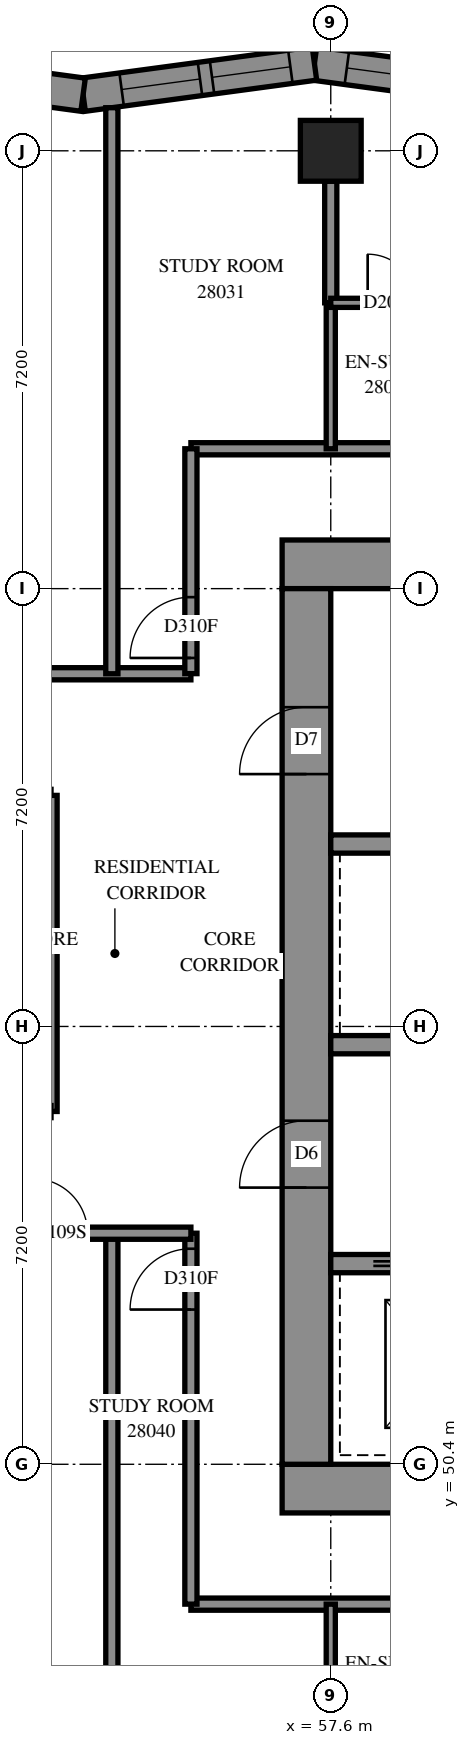
"""IFC4 building model, lengths in metres.
Left out: names, types, materials, properties, quantities, classifications, styles, units other than length and angle.
Written with IfcOpenShell. Run it as: python <this file> out.ifc"""

import sys

from ifc_helpers import new_model, si_unit, direction, frame, frame_2d, origin, origin_2d, place, context, subcontext, project, spatial, polyline, rectangle, outline, extrude, element, fill, save


model = new_model("IFC4")
c1 = context("Model", 3, precision=1e-05, world=origin(), true_north=direction((0.0, 1.0)))
c2 = subcontext(c1, "Body", "Model", "MODEL_VIEW")
j1 = project(units=[si_unit("LENGTHUNIT", "METRE"), si_unit("PLANEANGLEUNIT", "RADIAN")], contexts=[c1])
p1 = place(None, origin())
s1 = spatial("IfcSite", under=j1, at=p1, CompositionType="ELEMENT")
p2 = place(p1, origin())
s2 = spatial("IfcBuilding", under=s1, at=p2, CompositionType="ELEMENT")
p3 = place(p2, frame((0.0, 0.0, 105.0)))
s3 = spatial("IfcBuildingStorey", under=s2, at=p3, CompositionType="ELEMENT", Elevation=105.0)
p4 = place(p3, frame((57.6, 72.0, 0.0), z_axis=(0.0, 0.0, 1.0), x_axis=(1.0, 0.0, 0.0)))
e1 = element("IfcColumn", 1, at=p4, inside=s3, PredefinedType="COLUMN", context=c2, shape_type="SweptSolid", body=[
    extrude(rectangle(XDim=1.0, YDim=1.0, at=origin_2d()), origin(), (0.0, 0.0, 1.0), 3.1),
])
p5 = place(p3, frame((56.8, 50.0, -0.3), z_axis=(0.0, 0.0, 1.0), x_axis=(1.0, 0.0, 0.0)))
e2 = element("IfcWall", 2, at=p5, inside=s3, PredefinedType="SHEAR", context=c2, shape_type="SweptSolid", body=[
    extrude(rectangle(XDim=16.0, YDim=0.8, at=frame_2d((8.0, 0.0))), origin(), (0.0, 0.0, 1.0), 2.7),
])
p6 = place(p3, frame((56.8, 65.2, -0.3), z_axis=(0.0, 0.0, 1.0), x_axis=(1.0, 0.0, 0.0)))
e3 = element("IfcWall", 3, at=p6, inside=s3, PredefinedType="SHEAR", context=c2, shape_type="SweptSolid", body=[
    extrude(rectangle(XDim=16.0, YDim=0.8, at=frame_2d((8.0, 0.0))), origin(), (0.0, 0.0, 1.0), 2.7),
])
p7 = place(p6, frame((10.8, 0.0, 0.3)))
e4 = element("IfcOpeningElement", 4, at=p7, cuts=e3, PredefinedType="OPENING", context=c2, shape_type="SweptSolid", body=[
    extrude(rectangle(XDim=0.8, YDim=2.1, at=frame_2d((0.4, 1.05))), frame((0.0, 0.41, 0.0), z_axis=(0.0, -1.0, 0.0), x_axis=(1.0, 0.0, 0.0)), (0.0, 0.0, 1.0), 0.82),
])
p8 = place(p3, frame((57.2, 50.4, -0.3), z_axis=(0.0, 0.0, 1.0), x_axis=(0.0, 1.0, 0.0)))
e5 = element("IfcWall", 5, at=p8, inside=s3, PredefinedType="SHEAR", context=c2, shape_type="SweptSolid", body=[
    extrude(rectangle(XDim=14.4, YDim=0.8, at=frame_2d((7.2, 0.0))), origin(), (0.0, 0.0, 1.0), 2.7),
])
p9 = place(p8, frame((4.55, 0.0, 0.3)))
e6 = element("IfcOpeningElement", 6, at=p9, cuts=e5, PredefinedType="OPENING", context=c2, shape_type="SweptSolid", body=[
    extrude(rectangle(XDim=1.1, YDim=2.1, at=frame_2d((0.55, 1.05))), frame((0.0, 0.41, 0.0), z_axis=(0.0, -1.0, 0.0), x_axis=(1.0, 0.0, 0.0)), (0.0, 0.0, 1.0), 0.82),
])
p10 = place(p8, frame((11.35, 0.0, 0.3)))
e7 = element("IfcOpeningElement", 7, at=p10, cuts=e5, PredefinedType="OPENING", context=c2, shape_type="SweptSolid", body=[
    extrude(rectangle(XDim=1.1, YDim=2.1, at=frame_2d((0.55, 1.05))), frame((0.0, 0.41, 0.0), z_axis=(0.0, -1.0, 0.0), x_axis=(1.0, 0.0, 0.0)), (0.0, 0.0, 1.0), 0.82),
])
p11 = place(p3, frame((57.6, 53.7, 0.0), z_axis=(0.0, 0.0, 1.0), x_axis=(1.0, 0.0, 0.0)))
e8 = element("IfcWall", 8, at=p11, inside=s3, PredefinedType="SOLIDWALL", context=c2, shape_type="SweptSolid", body=[
    extrude(rectangle(XDim=14.4, YDim=0.3, at=frame_2d((7.2, 0.0))), origin(), (0.0, 0.0, 1.0), 3.1),
])
p12 = place(p11, frame((1.25, 0.0, 0.0)))
e9 = element("IfcOpeningElement", 9, at=p12, cuts=e8, PredefinedType="OPENING", context=c2, shape_type="SweptSolid", body=[
    extrude(rectangle(XDim=1.1, YDim=2.1, at=frame_2d((0.55, 1.05))), frame((0.0, 0.16, 0.0), z_axis=(0.0, -1.0, 0.0), x_axis=(1.0, 0.0, 0.0)), (0.0, 0.0, 1.0), 0.32),
])
p13 = place(p11, frame((4.85, 0.0, 0.0)))
e10 = element("IfcOpeningElement", 10, at=p13, cuts=e8, PredefinedType="OPENING", context=c2, shape_type="SweptSolid", body=[
    extrude(rectangle(XDim=1.1, YDim=2.1, at=frame_2d((0.55, 1.05))), frame((0.0, 0.16, 0.0), z_axis=(0.0, -1.0, 0.0), x_axis=(1.0, 0.0, 0.0)), (0.0, 0.0, 1.0), 0.32),
])
p14 = place(p11, frame((8.45, 0.0, 0.0)))
e11 = element("IfcOpeningElement", 11, at=p14, cuts=e8, PredefinedType="OPENING", context=c2, shape_type="SweptSolid", body=[
    extrude(rectangle(XDim=1.1, YDim=2.1, at=frame_2d((0.55, 1.05))), frame((0.0, 0.16, 0.0), z_axis=(0.0, -1.0, 0.0), x_axis=(1.0, 0.0, 0.0)), (0.0, 0.0, 1.0), 0.32),
])
p15 = place(p11, frame((12.05, 0.0, 0.0)))
e12 = element("IfcOpeningElement", 12, at=p15, cuts=e8, PredefinedType="OPENING", context=c2, shape_type="SweptSolid", body=[
    extrude(rectangle(XDim=1.1, YDim=2.1, at=frame_2d((0.55, 1.05))), frame((0.0, 0.16, 0.0), z_axis=(0.0, -1.0, 0.0), x_axis=(1.0, 0.0, 0.0)), (0.0, 0.0, 1.0), 0.32),
])
p16 = place(p3, frame((57.6, 57.3, 0.0), z_axis=(0.0, 0.0, 1.0), x_axis=(1.0, 0.0, 0.0)))
e13 = element("IfcWall", 13, at=p16, inside=s3, PredefinedType="SOLIDWALL", context=c2, shape_type="SweptSolid", body=[
    extrude(rectangle(XDim=14.4, YDim=0.3, at=frame_2d((7.2, 0.0))), origin(), (0.0, 0.0, 1.0), 3.1),
])
p17 = place(p16, frame((12.05, 0.0, 0.0)))
e14 = element("IfcOpeningElement", 14, at=p17, cuts=e13, PredefinedType="OPENING", context=c2, shape_type="SweptSolid", body=[
    extrude(rectangle(XDim=1.1, YDim=2.1, at=frame_2d((0.55, 1.05))), frame((0.0, 0.16, 0.0), z_axis=(0.0, -1.0, 0.0), x_axis=(1.0, 0.0, 0.0)), (0.0, 0.0, 1.0), 0.32),
])
p18 = place(p3, frame((57.6, 60.6, 0.0), z_axis=(0.0, 0.0, 1.0), x_axis=(1.0, 0.0, 0.0)))
e15 = element("IfcWall", 15, at=p18, inside=s3, PredefinedType="SOLIDWALL", context=c2, shape_type="SweptSolid", body=[
    extrude(rectangle(XDim=7.2, YDim=0.3, at=frame_2d((3.6, 0.0))), origin(), (0.0, 0.0, 1.0), 3.1),
])
p19 = place(p3, frame((61.136, 72.922, 0.0), z_axis=(0.0, 0.0, 1.0), x_axis=(-0.9910647018, 0.133381996, 0.0)))
e16 = element("IfcWall", 16, at=p19, inside=s3, PredefinedType="SOLIDWALL", context=c2, shape_type="SweptSolid", body=[
    extrude(outline(polyline([(0.037, -0.275), (3.876, -0.275), (3.802, 0.275), (-0.037, 0.275), (0.037, -0.275)])), origin(), (0.0, 0.0, 1.0), 3.1),
])
p20 = place(p19, frame((0.501, 0.0, 0.5)))
e17 = element("IfcOpeningElement", 17, at=p20, cuts=e16, PredefinedType="OPENING", context=c2, shape_type="SweptSolid", body=[
    extrude(rectangle(XDim=1.3, YDim=2.45, at=frame_2d((0.65, 1.225))), frame((0.0, 0.285, 0.0), z_axis=(0.0, -1.0, 0.0), x_axis=(1.0, 0.0, 0.0)), (0.0, 0.0, 1.0), 0.57),
])
p21 = place(p19, frame((2.001, 0.0, 0.5)))
e18 = element("IfcOpeningElement", 18, at=p21, cuts=e16, PredefinedType="OPENING", context=c2, shape_type="SweptSolid", body=[
    extrude(rectangle(XDim=1.3, YDim=2.45, at=frame_2d((0.65, 1.225))), frame((0.0, 0.285, 0.0), z_axis=(0.0, -1.0, 0.0), x_axis=(1.0, 0.0, 0.0)), (0.0, 0.0, 1.0), 0.57),
])
p22 = place(p3, frame((57.332, 73.434, 0.0), z_axis=(0.0, 0.0, 1.0), x_axis=(-0.9910651652, -0.1333785524, 0.0)))
e19 = element("IfcWall", 19, at=p22, inside=s3, PredefinedType="SOLIDWALL", context=c2, shape_type="SweptSolid", body=[
    extrude(outline(polyline([(-0.037, -0.275), (3.802, -0.275), (3.876, 0.275), (0.037, 0.275), (-0.037, -0.275)])), origin(), (0.0, 0.0, 1.0), 3.1),
])
p23 = place(p22, frame((0.399, 0.0, 0.5)))
e20 = element("IfcOpeningElement", 20, at=p23, cuts=e19, PredefinedType="OPENING", context=c2, shape_type="SweptSolid", body=[
    extrude(rectangle(XDim=1.3, YDim=2.45, at=frame_2d((0.65, 1.225))), frame((0.0, 0.285, 0.0), z_axis=(0.0, -1.0, 0.0), x_axis=(1.0, 0.0, 0.0)), (0.0, 0.0, 1.0), 0.57),
])
p24 = place(p22, frame((1.899, 0.0, 0.5)))
e21 = element("IfcOpeningElement", 21, at=p24, cuts=e19, PredefinedType="OPENING", context=c2, shape_type="SweptSolid", body=[
    extrude(rectangle(XDim=1.3, YDim=2.45, at=frame_2d((0.65, 1.225))), frame((0.0, 0.285, 0.0), z_axis=(0.0, -1.0, 0.0), x_axis=(1.0, 0.0, 0.0)), (0.0, 0.0, 1.0), 0.57),
])
p25 = place(p3, frame((53.527, 72.922, 0.0), z_axis=(0.0, 0.0, 1.0), x_axis=(-0.9910647018, 0.133381996, 0.0)))
e22 = element("IfcWall", 22, at=p25, inside=s3, PredefinedType="SOLIDWALL", context=c2, shape_type="SweptSolid", body=[
    extrude(outline(polyline([(0.037, -0.275), (3.876, -0.275), (3.802, 0.275), (-0.037, 0.275), (0.037, -0.275)])), origin(), (0.0, 0.0, 1.0), 3.1),
])
p26 = place(p25, frame((1.078, 0.0, 0.5)))
e23 = element("IfcOpeningElement", 23, at=p26, cuts=e22, PredefinedType="OPENING", context=c2, shape_type="SweptSolid", body=[
    extrude(rectangle(XDim=1.2, YDim=2.45, at=frame_2d((0.6, 1.225))), frame((0.0, 0.285, 0.0), z_axis=(0.0, -1.0, 0.0), x_axis=(1.0, 0.0, 0.0)), (0.0, 0.0, 1.0), 0.57),
])
p27 = place(p3, frame((33.4, 63.4, 0.0), z_axis=(0.0, 0.0, 1.0), x_axis=(1.0, 0.0, 0.0)))
e24 = element("IfcWall", 24, at=p27, inside=s3, PredefinedType="PARTITIONING", context=c2, shape_type="SweptSolid", body=[
    extrude(rectangle(XDim=21.9, YDim=0.2, at=frame_2d((10.95, 0.0))), origin(), (0.0, 0.0, 1.0), 3.1),
])
p28 = place(p27, frame((3.152, 0.0, 0.0)))
e25 = element("IfcOpeningElement", 25, at=p28, cuts=e24, PredefinedType="OPENING", context=c2, shape_type="SweptSolid", body=[
    extrude(rectangle(XDim=0.9, YDim=2.1, at=frame_2d((0.45, 1.05))), frame((0.0, 0.11, 0.0), z_axis=(0.0, -1.0, 0.0), x_axis=(1.0, 0.0, 0.0)), (0.0, 0.0, 1.0), 0.22),
])
p29 = place(p27, frame((8.161, 0.0, 0.0)))
e26 = element("IfcOpeningElement", 26, at=p29, cuts=e24, PredefinedType="OPENING", context=c2, shape_type="SweptSolid", body=[
    extrude(rectangle(XDim=0.9, YDim=2.1, at=frame_2d((0.45, 1.05))), frame((0.0, 0.11, 0.0), z_axis=(0.0, -1.0, 0.0), x_axis=(1.0, 0.0, 0.0)), (0.0, 0.0, 1.0), 0.22),
])
p30 = place(p27, frame((15.471, 0.0, 0.0)))
e27 = element("IfcOpeningElement", 27, at=p30, cuts=e24, PredefinedType="OPENING", context=c2, shape_type="SweptSolid", body=[
    extrude(rectangle(XDim=1.0, YDim=2.1, at=frame_2d((0.5, 1.05))), frame((0.0, 0.11, 0.0), z_axis=(0.0, -1.0, 0.0), x_axis=(1.0, 0.0, 0.0)), (0.0, 0.0, 1.0), 0.22),
])
p31 = place(p3, frame((55.3, 48.1, 0.0), z_axis=(0.0, 0.0, 1.0), x_axis=(1.0, 0.0, 0.0)))
e28 = element("IfcWall", 28, at=p31, inside=s3, PredefinedType="PARTITIONING", context=c2, shape_type="SweptSolid", body=[
    extrude(rectangle(XDim=19.092, YDim=0.2, at=frame_2d((9.546, 0.0))), origin(), (0.0, 0.0, 1.0), 3.1),
])
p32 = place(p31, frame((4.6, 0.0, 0.0)))
e29 = element("IfcOpeningElement", 29, at=p32, cuts=e28, PredefinedType="OPENING", context=c2, shape_type="SweptSolid", body=[
    extrude(rectangle(XDim=0.9, YDim=2.1, at=frame_2d((0.45, 1.05))), frame((0.0, 0.11, 0.0), z_axis=(0.0, -1.0, 0.0), x_axis=(1.0, 0.0, 0.0)), (0.0, 0.0, 1.0), 0.22),
])
p33 = place(p31, frame((8.239, 0.0, 0.0)))
e30 = element("IfcOpeningElement", 30, at=p33, cuts=e28, PredefinedType="OPENING", context=c2, shape_type="SweptSolid", body=[
    extrude(rectangle(XDim=0.9, YDim=2.1, at=frame_2d((0.45, 1.05))), frame((0.0, 0.11, 0.0), z_axis=(0.0, -1.0, 0.0), x_axis=(1.0, 0.0, 0.0)), (0.0, 0.0, 1.0), 0.22),
])
p34 = place(p31, frame((13.5, 0.0, 0.0)))
e31 = element("IfcOpeningElement", 31, at=p34, cuts=e28, PredefinedType="OPENING", context=c2, shape_type="SweptSolid", body=[
    extrude(rectangle(XDim=0.9, YDim=2.1, at=frame_2d((0.45, 1.05))), frame((0.0, 0.11, 0.0), z_axis=(0.0, -1.0, 0.0), x_axis=(1.0, 0.0, 0.0)), (0.0, 0.0, 1.0), 0.22),
])
p35 = place(p3, frame((55.3, 67.1, 0.0), z_axis=(0.0, 0.0, 1.0), x_axis=(1.0, 0.0, 0.0)))
e32 = element("IfcWall", 32, at=p35, inside=s3, PredefinedType="PARTITIONING", context=c2, shape_type="SweptSolid", body=[
    extrude(rectangle(XDim=19.0, YDim=0.2, at=frame_2d((9.5, 0.0))), origin(), (0.0, 0.0, 1.0), 3.1),
])
p36 = place(p35, frame((6.199, 0.0, 0.0)))
e33 = element("IfcOpeningElement", 33, at=p36, cuts=e32, PredefinedType="OPENING", context=c2, shape_type="SweptSolid", body=[
    extrude(rectangle(XDim=0.9, YDim=2.1, at=frame_2d((0.45, 1.05))), frame((0.0, 0.11, 0.0), z_axis=(0.0, -1.0, 0.0), x_axis=(1.0, 0.0, 0.0)), (0.0, 0.0, 1.0), 0.22),
])
p37 = place(p35, frame((13.399, 0.0, 0.0)))
e34 = element("IfcOpeningElement", 34, at=p37, cuts=e32, PredefinedType="OPENING", context=c2, shape_type="SweptSolid", body=[
    extrude(rectangle(XDim=0.9, YDim=2.1, at=frame_2d((0.45, 1.05))), frame((0.0, 0.11, 0.0), z_axis=(0.0, -1.0, 0.0), x_axis=(1.0, 0.0, 0.0)), (0.0, 0.0, 1.0), 0.22),
])
p38 = place(p3, frame((54.0, 42.348, 0.0), z_axis=(0.0, 0.0, 1.0), x_axis=(0.0, 1.0, 0.0)))
e35 = element("IfcWall", 35, at=p38, inside=s3, PredefinedType="PARTITIONING", context=c2, shape_type="SweptSolid", body=[
    extrude(rectangle(XDim=11.852, YDim=0.2, at=frame_2d((5.926, 0.0))), origin(), (0.0, 0.0, 1.0), 3.1),
])
p39 = place(p3, frame((54.0, 63.4, 0.0), z_axis=(0.0, 0.0, 1.0), x_axis=(0.0, 1.0, 0.0)))
e36 = element("IfcWall", 36, at=p39, inside=s3, PredefinedType="PARTITIONING", context=c2, shape_type="SweptSolid", body=[
    extrude(rectangle(XDim=9.309, YDim=0.2, at=frame_2d((4.654, 0.0))), origin(), (0.0, 0.0, 1.0), 3.1),
])
p40 = place(p3, frame((55.3, 48.1, 0.0), z_axis=(0.0, 0.0, 1.0), x_axis=(0.0, 1.0, 0.0)))
e37 = element("IfcWall", 37, at=p40, inside=s3, PredefinedType="PARTITIONING", context=c2, shape_type="SweptSolid", body=[
    extrude(rectangle(XDim=6.1, YDim=0.2, at=frame_2d((3.05, 0.0))), origin(), (0.0, 0.0, 1.0), 3.1),
])
p41 = place(p40, frame((4.845, 0.0, 0.0)))
e38 = element("IfcOpeningElement", 38, at=p41, cuts=e37, PredefinedType="OPENING", context=c2, shape_type="SweptSolid", body=[
    extrude(rectangle(XDim=1.0, YDim=2.1, at=frame_2d((0.5, 1.05))), frame((0.0, 0.11, 0.0), z_axis=(0.0, -1.0, 0.0), x_axis=(1.0, 0.0, 0.0)), (0.0, 0.0, 1.0), 0.22),
])
p42 = place(p3, frame((53.0, 56.202, 0.0), z_axis=(0.0, 0.0, 1.0), x_axis=(0.0, 1.0, 0.0)))
e39 = element("IfcWall", 39, at=p42, inside=s3, PredefinedType="PARTITIONING", context=c2, shape_type="SweptSolid", body=[
    extrude(rectangle(XDim=5.198, YDim=0.2, at=frame_2d((2.599, 0.0))), origin(), (0.0, 0.0, 1.0), 3.1),
])
p43 = place(p3, frame((50.4, 54.2, 0.0), z_axis=(0.0, 0.0, 1.0), x_axis=(1.0, 0.0, 0.0)))
e40 = element("IfcWall", 40, at=p43, inside=s3, PredefinedType="PARTITIONING", context=c2, shape_type="SweptSolid", body=[
    extrude(rectangle(XDim=4.9, YDim=0.2, at=frame_2d((2.45, 0.0))), origin(), (0.0, 0.0, 1.0), 3.1),
])
p44 = place(p43, frame((2.3, 0.0, 0.0)))
e41 = element("IfcOpeningElement", 41, at=p44, cuts=e40, PredefinedType="OPENING", context=c2, shape_type="SweptSolid", body=[
    extrude(rectangle(XDim=0.9, YDim=2.1, at=frame_2d((0.45, 1.05))), frame((0.0, 0.11, 0.0), z_axis=(0.0, -1.0, 0.0), x_axis=(1.0, 0.0, 0.0)), (0.0, 0.0, 1.0), 0.22),
])
p45 = place(p3, frame((55.3, 63.402, 0.0), z_axis=(0.0, 0.0, 1.0), x_axis=(0.0, 1.0, 0.0)))
e42 = element("IfcWall", 42, at=p45, inside=s3, PredefinedType="PARTITIONING", context=c2, shape_type="SweptSolid", body=[
    extrude(rectangle(XDim=3.698, YDim=0.2, at=frame_2d((1.849, 0.0))), origin(), (0.0, 0.0, 1.0), 3.1),
])
p46 = place(p45, frame((0.258, 0.0, 0.0)))
e43 = element("IfcOpeningElement", 43, at=p46, cuts=e42, PredefinedType="OPENING", context=c2, shape_type="SweptSolid", body=[
    extrude(rectangle(XDim=1.0, YDim=2.1, at=frame_2d((0.5, 1.05))), frame((0.0, 0.11, 0.0), z_axis=(0.0, -1.0, 0.0), x_axis=(1.0, 0.0, 0.0)), (0.0, 0.0, 1.0), 0.22),
])
for number, where, z_axis, x_axis in (
    (44, (57.6, 67.1, 0.0), (0.0, 0.0, 1.0), (0.0, 1.0, 0.0)),
    (45, (57.6, 45.7, 0.0), (0.0, 0.0, 1.0), (0.0, 1.0, 0.0)),
):
    element("IfcWall", number, at=place(p3, frame(where, z_axis=z_axis, x_axis=x_axis)), inside=s3, PredefinedType="PARTITIONING", context=c2, shape_type="SweptSolid", body=[
        extrude(rectangle(XDim=2.4, YDim=0.15, at=frame_2d((1.2, 0.0))), origin(), (0.0, 0.0, 1.0), 3.1),
    ])
p47 = place(p3, frame((57.6, 69.5, 0.0), z_axis=(0.0, 0.0, 1.0), x_axis=(0.0, 1.0, 0.0)))
e46 = element("IfcWall", 46, at=p47, inside=s3, PredefinedType="PARTITIONING", context=c2, shape_type="SweptSolid", body=[
    extrude(rectangle(XDim=2.0, YDim=0.2, at=frame_2d((1.0, 0.0))), origin(), (0.0, 0.0, 1.0), 3.1),
])
p48 = place(p3, frame((57.6, 69.5, 0.0), z_axis=(0.0, 0.0, 1.0), x_axis=(1.0, 0.0, 0.0)))
e47 = element("IfcWall", 47, at=p48, inside=s3, PredefinedType="PARTITIONING", context=c2, shape_type="SweptSolid", body=[
    extrude(rectangle(XDim=1.9, YDim=0.15, at=frame_2d((0.95, 0.0))), origin(), (0.0, 0.0, 1.0), 3.1),
])
p49 = place(p48, frame((0.607, 0.0, 0.0)))
e48 = element("IfcOpeningElement", 48, at=p49, cuts=e47, PredefinedType="OPENING", context=c2, shape_type="SweptSolid", body=[
    extrude(rectangle(XDim=0.8, YDim=2.1, at=frame_2d((0.4, 1.05))), frame((0.0, 0.085, 0.0), z_axis=(0.0, -1.0, 0.0), x_axis=(1.0, 0.0, 0.0)), (0.0, 0.0, 1.0), 0.17),
])
p50 = place(p21, origin())
e49 = element("IfcWindow", 49, at=p50, inside=s3, PartitioningType="SINGLE_PANEL", PredefinedType="WINDOW", context=c2, shape_type="SweptSolid", body=[
    extrude(rectangle(XDim=1.3, YDim=2.45, at=frame_2d((0.65, 1.225))), frame((0.0, 0.155, 0.0), z_axis=(0.0, -1.0, 0.0), x_axis=(1.0, 0.0, 0.0)), (0.0, 0.0, 1.0), 0.06),
])
fill(e18, e49)
p51 = place(p23, origin())
e50 = element("IfcWindow", 50, at=p51, inside=s3, PartitioningType="SINGLE_PANEL", PredefinedType="WINDOW", context=c2, shape_type="SweptSolid", body=[
    extrude(rectangle(XDim=1.3, YDim=2.45, at=frame_2d((0.65, 1.225))), frame((0.0, 0.155, 0.0), z_axis=(0.0, -1.0, 0.0), x_axis=(1.0, 0.0, 0.0)), (0.0, 0.0, 1.0), 0.06),
])
fill(e20, e50)
p52 = place(p24, origin())
e51 = element("IfcWindow", 51, at=p52, inside=s3, PartitioningType="SINGLE_PANEL", PredefinedType="WINDOW", context=c2, shape_type="SweptSolid", body=[
    extrude(rectangle(XDim=1.3, YDim=2.45, at=frame_2d((0.65, 1.225))), frame((0.0, 0.155, 0.0), z_axis=(0.0, -1.0, 0.0), x_axis=(1.0, 0.0, 0.0)), (0.0, 0.0, 1.0), 0.06),
])
fill(e21, e51)
p53 = place(p9, origin())
e52 = element("IfcDoor", 52, at=p53, inside=s3, OperationType="DOUBLE_DOOR_SINGLE_SWING", PredefinedType="DOOR", context=c2, shape_type="SweptSolid", body=[
    extrude(rectangle(XDim=1.1, YDim=2.1, at=frame_2d((0.55, 1.05))), frame((0.0, 0.025, 0.0), z_axis=(0.0, -1.0, 0.0), x_axis=(1.0, 0.0, 0.0)), (0.0, 0.0, 1.0), 0.05),
])
fill(e6, e52)
p54 = place(p10, origin())
e53 = element("IfcDoor", 53, at=p54, inside=s3, OperationType="SINGLE_SWING_LEFT", PredefinedType="DOOR", context=c2, shape_type="SweptSolid", body=[
    extrude(rectangle(XDim=1.1, YDim=2.1, at=frame_2d((0.55, 1.05))), frame((0.0, 0.025, 0.0), z_axis=(0.0, -1.0, 0.0), x_axis=(1.0, 0.0, 0.0)), (0.0, 0.0, 1.0), 0.05),
])
fill(e7, e53)
p55 = place(p46, origin())
e54 = element("IfcDoor", 54, at=p55, inside=s3, OperationType="SINGLE_SWING_LEFT", PredefinedType="DOOR", context=c2, shape_type="SweptSolid", body=[
    extrude(rectangle(XDim=1.0, YDim=2.1, at=frame_2d((0.5, 1.05))), frame((0.0, 0.025, 0.0), z_axis=(0.0, -1.0, 0.0), x_axis=(1.0, 0.0, 0.0)), (0.0, 0.0, 1.0), 0.05),
])
fill(e43, e54)
p56 = place(p44, origin())
e55 = element("IfcDoor", 55, at=p56, inside=s3, OperationType="SINGLE_SWING_LEFT", PredefinedType="DOOR", context=c2, shape_type="SweptSolid", body=[
    extrude(rectangle(XDim=0.9, YDim=2.1, at=frame_2d((0.45, 1.05))), frame((0.0, 0.025, 0.0), z_axis=(0.0, -1.0, 0.0), x_axis=(1.0, 0.0, 0.0)), (0.0, 0.0, 1.0), 0.05),
])
fill(e41, e55)
p57 = place(p41, origin())
e56 = element("IfcDoor", 56, at=p57, inside=s3, OperationType="SINGLE_SWING_RIGHT", PredefinedType="DOOR", context=c2, shape_type="SweptSolid", body=[
    extrude(rectangle(XDim=1.0, YDim=2.1, at=frame_2d((0.5, 1.05))), frame((0.0, 0.025, 0.0), z_axis=(0.0, -1.0, 0.0), x_axis=(1.0, 0.0, 0.0)), (0.0, 0.0, 1.0), 0.05),
])
fill(e38, e56)
p58 = place(p49, origin())
e57 = element("IfcDoor", 57, at=p58, inside=s3, OperationType="SINGLE_SWING_RIGHT", PredefinedType="DOOR", context=c2, shape_type="SweptSolid", body=[
    extrude(rectangle(XDim=0.8, YDim=2.1, at=frame_2d((0.4, 1.05))), frame((0.0, 0.025, 0.0), z_axis=(0.0, -1.0, 0.0), x_axis=(1.0, 0.0, 0.0)), (0.0, 0.0, 1.0), 0.05),
])
fill(e48, e57)
save(model, sys.argv[1])
